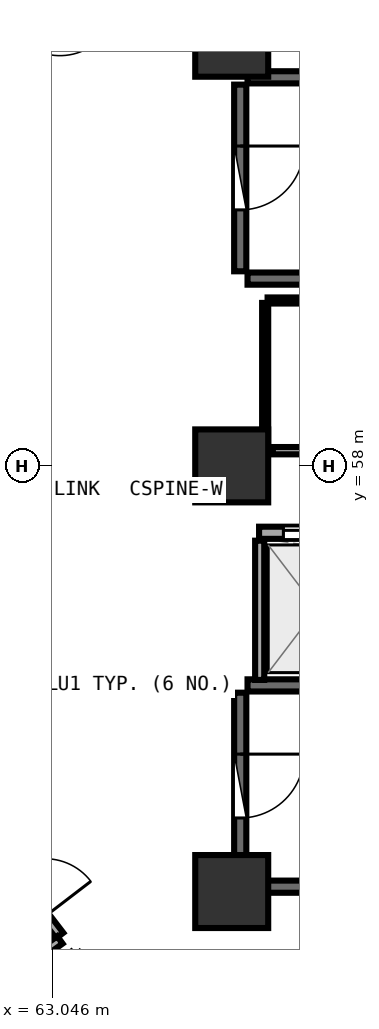
"""IFC4 building model, lengths in metres.
Left out: names, types, materials, properties, quantities, classifications, styles, units other than length and angle.
Written with IfcOpenShell. Run it as: python <this file> out.ifc"""

import sys

from ifc_helpers import new_model, si_unit, direction, frame, frame_2d, origin, origin_2d, place, context, subcontext, project, spatial, rectangle, extrude, element, fill, save


model = new_model("IFC4")
c1 = context("Model", 3, precision=1e-05, world=origin(), true_north=direction((0.0, 1.0)))
c2 = subcontext(c1, "Body", "Model", "MODEL_VIEW")
j1 = project(units=[si_unit("LENGTHUNIT", "METRE"), si_unit("PLANEANGLEUNIT", "RADIAN")], contexts=[c1])
p1 = place(None, origin())
s1 = spatial("IfcSite", under=j1, at=p1, CompositionType="ELEMENT")
p2 = place(p1, origin())
s2 = spatial("IfcBuilding", under=s1, at=p2, CompositionType="ELEMENT")
p3 = place(p2, frame((0.0, 0.0, 143.1)))
s3 = spatial("IfcBuildingStorey", under=s2, at=p3, CompositionType="ELEMENT", Elevation=143.1)
for number, where, z_axis, x_axis in (
    (1, (66.0, 51.0, 0.0), (0.0, 0.0, 1.0), (1.0, 0.0, 0.0)),
    (2, (66.0, 65.0, 0.0), (0.0, 0.0, 1.0), (1.0, 0.0, 0.0)),
    (3, (66.0, 58.0, 0.0), (0.0, 0.0, 1.0), (1.0, 0.0, 0.0)),
):
    element("IfcColumn", number, at=place(p3, frame(where, z_axis=z_axis, x_axis=x_axis)), inside=s3, PredefinedType="PILASTER", context=c2, shape_type="SweptSolid", body=[
        extrude(rectangle(XDim=1.2, YDim=1.2, at=origin_2d()), origin(), (0.0, 0.0, 1.0), 3.75),
    ])
for number, where, z_axis, x_axis in (
    (4, (66.26, 61.08, 0.0), (0.0, 0.0, 1.0), (1.0, 0.0, 0.0)),
    (5, (73.42, 64.39, 0.0), (0.0, 0.0, 1.0), (-1.0, 0.0, 0.0)),
):
    element("IfcWall", number, at=place(p3, frame(where, z_axis=z_axis, x_axis=x_axis)), inside=s3, PredefinedType="SHEAR", context=c2, shape_type="SweptSolid", body=[
        extrude(rectangle(XDim=7.16, YDim=0.2, at=frame_2d((3.58, 0.0))), origin(), (0.0, 0.0, 1.0), 3.49),
    ])
p4 = place(p3, frame((66.14, 64.27, 0.0), z_axis=(0.0, 0.0, 1.0), x_axis=(0.0, -1.0, 0.0)))
e6 = element("IfcWall", 6, at=p4, inside=s3, PredefinedType="SHEAR", context=c2, shape_type="SweptSolid", body=[
    extrude(rectangle(XDim=3.07, YDim=0.2, at=frame_2d((1.535, 0.0))), origin(), (0.0, 0.0, 1.0), 3.49),
])
p5 = place(p4, frame((1.01, 0.0, 0.0)))
e7 = element("IfcOpeningElement", 7, at=p5, cuts=e6, PredefinedType="OPENING", context=c2, shape_type="SweptSolid", body=[
    extrude(rectangle(XDim=1.05, YDim=2.1, at=frame_2d((0.525, 1.05))), frame((0.0, 0.11, 0.0), z_axis=(0.0, -1.0, 0.0), x_axis=(1.0, 0.0, 0.0)), (0.0, 0.0, 1.0), 0.22),
])
for number, where, z_axis, x_axis in (
    (8, (66.26, 51.08, 0.0), (0.0, 0.0, 1.0), (1.0, 0.0, 0.0)),
    (9, (73.42, 54.39, 0.0), (0.0, 0.0, 1.0), (-1.0, 0.0, 0.0)),
):
    element("IfcWall", number, at=place(p3, frame(where, z_axis=z_axis, x_axis=x_axis)), inside=s3, PredefinedType="SHEAR", context=c2, shape_type="SweptSolid", body=[
        extrude(rectangle(XDim=7.16, YDim=0.2, at=frame_2d((3.58, 0.0))), origin(), (0.0, 0.0, 1.0), 3.49),
    ])
p6 = place(p3, frame((66.14, 54.27, 0.0), z_axis=(0.0, 0.0, 1.0), x_axis=(0.0, -1.0, 0.0)))
e10 = element("IfcWall", 10, at=p6, inside=s3, PredefinedType="SHEAR", context=c2, shape_type="SweptSolid", body=[
    extrude(rectangle(XDim=3.07, YDim=0.2, at=frame_2d((1.535, 0.0))), origin(), (0.0, 0.0, 1.0), 3.49),
])
p7 = place(p6, frame((1.01, 0.0, 0.0)))
e11 = element("IfcOpeningElement", 11, at=p7, cuts=e10, PredefinedType="OPENING", context=c2, shape_type="SweptSolid", body=[
    extrude(rectangle(XDim=1.05, YDim=2.1, at=frame_2d((0.525, 1.05))), frame((0.0, 0.11, 0.0), z_axis=(0.0, -1.0, 0.0), x_axis=(1.0, 0.0, 0.0)), (0.0, 0.0, 1.0), 0.22),
])
p8 = place(p3, frame((66.45, 56.9, 0.0), z_axis=(0.0, 0.0, 1.0), x_axis=(1.0, 0.0, 0.0)))
e12 = element("IfcWall", 12, at=p8, inside=s3, PredefinedType="SOLIDWALL", context=c2, shape_type="SweptSolid", body=[
    extrude(rectangle(XDim=14.4, YDim=0.2, at=frame_2d((7.2, 0.0))), origin(), (0.0, 0.0, 1.0), 3.48),
])
p9 = place(p8, frame((0.4, 0.0, 0.0)))
e13 = element("IfcOpeningElement", 13, at=p9, cuts=e12, PredefinedType="OPENING", context=c2, shape_type="SweptSolid", body=[
    extrude(rectangle(XDim=1.1, YDim=2.1, at=frame_2d((0.55, 1.05))), frame((0.0, 0.11, 0.0), z_axis=(0.0, -1.0, 0.0), x_axis=(1.0, 0.0, 0.0)), (0.0, 0.0, 1.0), 0.22),
])
p10 = place(p8, frame((2.4, 0.0, 0.0)))
e14 = element("IfcOpeningElement", 14, at=p10, cuts=e12, PredefinedType="OPENING", context=c2, shape_type="SweptSolid", body=[
    extrude(rectangle(XDim=1.1, YDim=2.1, at=frame_2d((0.55, 1.05))), frame((0.0, 0.11, 0.0), z_axis=(0.0, -1.0, 0.0), x_axis=(1.0, 0.0, 0.0)), (0.0, 0.0, 1.0), 0.22),
])
p11 = place(p8, frame((4.4, 0.0, 0.0)))
e15 = element("IfcOpeningElement", 15, at=p11, cuts=e12, PredefinedType="OPENING", context=c2, shape_type="SweptSolid", body=[
    extrude(rectangle(XDim=1.1, YDim=2.1, at=frame_2d((0.55, 1.05))), frame((0.0, 0.11, 0.0), z_axis=(0.0, -1.0, 0.0), x_axis=(1.0, 0.0, 0.0)), (0.0, 0.0, 1.0), 0.22),
])
p12 = place(p3, frame((66.46, 54.48, 0.0), z_axis=(0.0, 0.0, 1.0), x_axis=(0.0, 1.0, 0.0)))
e16 = element("IfcWall", 16, at=p12, inside=s3, PredefinedType="PARTITIONING", context=c2, shape_type="SweptSolid", body=[
    extrude(rectangle(XDim=2.29, YDim=0.15, at=frame_2d((1.145, 0.0))), origin(), (0.0, 0.0, 1.0), 3.48),
])
p13 = place(p3, frame((66.675, 58.25, 0.0), z_axis=(0.0, 0.0, 1.0), x_axis=(1.0, 0.0, 0.0)))
e17 = element("IfcWall", 17, at=p13, inside=s3, PredefinedType="PARTITIONING", context=c2, shape_type="SweptSolid", body=[
    extrude(rectangle(XDim=5.715, YDim=0.12, at=frame_2d((2.857, 0.0))), origin(), (0.0, 0.0, 1.0), 3.48),
])
p14 = place(p13, frame((2.407, 0.0, 0.0)))
e18 = element("IfcOpeningElement", 18, at=p14, cuts=e17, PredefinedType="OPENING", context=c2, shape_type="SweptSolid", body=[
    extrude(rectangle(XDim=0.9, YDim=2.08, at=frame_2d((0.45, 1.04))), frame((0.0, 0.07, 0.0), z_axis=(0.0, -1.0, 0.0), x_axis=(1.0, 0.0, 0.0)), (0.0, 0.0, 1.0), 0.14),
])
p15 = place(p3, frame((63.426, 66.006, 0.0), z_axis=(0.0, 0.0, 1.0), x_axis=(-0.63192798372, -0.775027111391, 0.0)))
e19 = element("IfcWall", 19, at=p15, inside=s3, PredefinedType="PARTITIONING", context=c2, shape_type="SweptSolid", body=[
    extrude(rectangle(XDim=1.747, YDim=0.15, at=frame_2d((0.874, 0.0))), origin(), (0.0, 0.0, 1.0), 2.975),
])
p16 = place(p15, frame((0.399, 0.0, 0.0)))
e20 = element("IfcOpeningElement", 20, at=p16, cuts=e19, PredefinedType="OPENING", context=c2, shape_type="SweptSolid", body=[
    extrude(rectangle(XDim=0.95, YDim=2.08, at=frame_2d((0.475, 1.04))), frame((0.0, 0.085, 0.0), z_axis=(0.0, -1.0, 0.0), x_axis=(1.0, 0.0, 0.0)), (0.0, 0.0, 1.0), 0.17),
])
p17 = place(p3, frame((62.111, 51.658, 0.0), z_axis=(0.0, 0.0, 1.0), x_axis=(0.608307977949, -0.793701079729, 0.0)))
e21 = element("IfcWall", 21, at=p17, inside=s3, PredefinedType="PARTITIONING", context=c2, shape_type="SweptSolid", body=[
    extrude(rectangle(XDim=1.742, YDim=0.15, at=frame_2d((0.871, 0.0))), origin(), (0.0, 0.0, 1.0), 2.975),
])
p18 = place(p17, frame((0.396, 0.0, 0.0)))
e22 = element("IfcOpeningElement", 22, at=p18, cuts=e21, PredefinedType="OPENING", context=c2, shape_type="SweptSolid", body=[
    extrude(rectangle(XDim=0.95, YDim=2.08, at=frame_2d((0.475, 1.04))), frame((0.0, 0.085, 0.0), z_axis=(0.0, -1.0, 0.0), x_axis=(1.0, 0.0, 0.0)), (0.0, 0.0, 1.0), 0.17),
])
p19 = place(p3, frame((72.41, 60.72, 0.0), z_axis=(0.0, 0.0, 1.0), x_axis=(-1.0, 0.0, 0.0)))
e23 = element("IfcWall", 23, at=p19, inside=s3, PredefinedType="PARTITIONING", context=c2, shape_type="SweptSolid", body=[
    extrude(rectangle(XDim=5.82, YDim=0.1, at=frame_2d((2.91, 0.0))), origin(), (0.0, 0.0, 1.0), 3.48),
])
p20 = place(p3, frame((66.55, 60.68, 0.0), z_axis=(0.0, 0.0, 1.0), x_axis=(0.0, -1.0, 0.0)))
e24 = element("IfcWall", 24, at=p20, inside=s3, PredefinedType="PARTITIONING", context=c2, shape_type="SweptSolid", body=[
    extrude(rectangle(XDim=2.383, YDim=0.1, at=frame_2d((1.191, 0.0))), origin(), (0.0, 0.0, 1.0), 3.48),
])
p21 = place(p3, frame((63.175, 50.205, 0.0), z_axis=(0.0, 0.0, 1.0), x_axis=(-0.810227225477, -0.586115895618, 0.0)))
e25 = element("IfcWall", 25, at=p21, inside=s3, PredefinedType="PARTITIONING", context=c2, shape_type="SweptSolid", body=[
    extrude(rectangle(XDim=7.011, YDim=0.15, at=frame_2d((3.506, 0.0))), origin(), (0.0, 0.0, 1.0), 3.175),
])
p22 = place(p5, origin())
e26 = element("IfcDoor", 26, at=p22, inside=s3, OperationType="SINGLE_SWING_LEFT", PredefinedType="DOOR", context=c2, shape_type="SweptSolid", body=[
    extrude(rectangle(XDim=1.05, YDim=2.1, at=frame_2d((0.525, 1.05))), frame((0.0, 0.025, 0.0), z_axis=(0.0, -1.0, 0.0), x_axis=(1.0, 0.0, 0.0)), (0.0, 0.0, 1.0), 0.05),
])
fill(e7, e26)
p23 = place(p7, origin())
e27 = element("IfcDoor", 27, at=p23, inside=s3, OperationType="SINGLE_SWING_LEFT", PredefinedType="DOOR", context=c2, shape_type="SweptSolid", body=[
    extrude(rectangle(XDim=1.05, YDim=2.1, at=frame_2d((0.525, 1.05))), frame((0.0, 0.025, 0.0), z_axis=(0.0, -1.0, 0.0), x_axis=(1.0, 0.0, 0.0)), (0.0, 0.0, 1.0), 0.05),
])
fill(e11, e27)
p24 = place(p9, origin())
e28 = element("IfcDoor", 28, at=p24, inside=s3, OperationType="DOUBLE_DOOR_SLIDING", PredefinedType="DOOR", context=c2, shape_type="SweptSolid", body=[
    extrude(rectangle(XDim=1.1, YDim=2.1, at=frame_2d((0.55, 1.05))), frame((0.0, 0.025, 0.0), z_axis=(0.0, -1.0, 0.0), x_axis=(1.0, 0.0, 0.0)), (0.0, 0.0, 1.0), 0.05),
])
fill(e13, e28)
save(model, sys.argv[1])
